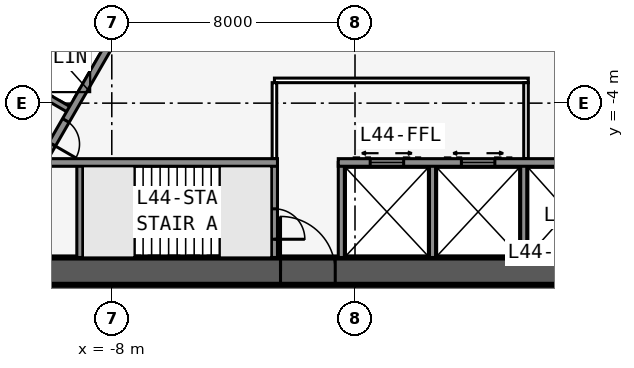
"""IFC4 building model, lengths in metres.
Left out: names, types, materials, properties, quantities, classifications, styles, units other than length and angle.
Written with IfcOpenShell. Run it as: python <this file> out.ifc"""

import sys

from ifc_helpers import new_model, si_unit, direction, frame, frame_2d, origin, place, context, subcontext, project, spatial, rectangle, extrude, element, fill, save


model = new_model("IFC4")
c1 = context("Model", 3, precision=1e-05, world=origin(), true_north=direction((0.0, 1.0)))
c2 = subcontext(c1, "Body", "Model", "MODEL_VIEW")
j1 = project(units=[si_unit("LENGTHUNIT", "METRE"), si_unit("PLANEANGLEUNIT", "RADIAN")], contexts=[c1])
p1 = place(None, origin())
s1 = spatial("IfcSite", under=j1, at=p1, CompositionType="ELEMENT")
p2 = place(p1, origin())
s2 = spatial("IfcBuilding", under=s1, at=p2, CompositionType="ELEMENT")
p3 = place(p2, frame((0.0, 0.0, 165.7)))
s3 = spatial("IfcBuildingStorey", under=s2, at=p3, CompositionType="ELEMENT", Elevation=165.7)
p4 = place(p3, frame((-16.5, -9.526, 0.0), z_axis=(0.0, 0.0, 1.0), x_axis=(1.0, 0.0, 0.0)))
e1 = element("IfcWall", 1, at=p4, inside=s3, PredefinedType="SHEAR", context=c2, shape_type="SweptSolid", body=[
    extrude(rectangle(XDim=33.0, YDim=0.9, at=frame_2d((16.5, 0.0))), origin(), (0.0, 0.0, 1.0), 3.4),
])
p5 = place(p4, frame((14.05, 0.0, 0.0)))
e2 = element("IfcOpeningElement", 2, at=p5, cuts=e1, PredefinedType="OPENING", context=c2, shape_type="SweptSolid", body=[
    extrude(rectangle(XDim=1.8, YDim=2.13, at=frame_2d((0.9, 1.065))), frame((0.0, 0.46, 0.0), z_axis=(0.0, -1.0, 0.0), x_axis=(1.0, 0.0, 0.0)), (0.0, 0.0, 1.0), 0.92),
])
p6 = place(p3, frame((-10.183, -5.951, 0.0), z_axis=(0.0, 0.0, 1.0), x_axis=(1.0, 0.0, 0.0)))
e3 = element("IfcWall", 3, at=p6, inside=s3, PredefinedType="SOLIDWALL", context=c2, shape_type="SweptSolid", body=[
    extrude(rectangle(XDim=7.633, YDim=0.25, at=frame_2d((3.816, 0.0))), origin(), (0.0, 0.0, 1.0), 3.235),
])
p7 = place(p3, frame((-0.55, -5.951, 0.0), z_axis=(0.0, 0.0, 1.0), x_axis=(1.0, 0.0, 0.0)))
e4 = element("IfcWall", 4, at=p7, inside=s3, PredefinedType="SOLIDWALL", context=c2, shape_type="SweptSolid", body=[
    extrude(rectangle(XDim=10.733, YDim=0.25, at=frame_2d((5.366, 0.0))), origin(), (0.0, 0.0, 1.0), 3.235),
])
p8 = place(p7, frame((9.314, 0.0, 0.0)))
e5 = element("IfcOpeningElement", 5, at=p8, cuts=e4, PredefinedType="OPENING", context=c2, shape_type="SweptSolid", body=[
    extrude(rectangle(XDim=0.9, YDim=2.13, at=frame_2d((0.45, 1.065))), frame((0.0, 0.135, 0.0), z_axis=(0.0, -1.0, 0.0), x_axis=(1.0, 0.0, 0.0)), (0.0, 0.0, 1.0), 0.27),
])
p9 = place(p7, frame((1.05, 0.0, 0.0)))
e6 = element("IfcOpeningElement", 6, at=p9, cuts=e4, PredefinedType="OPENING", context=c2, shape_type="SweptSolid", body=[
    extrude(rectangle(XDim=1.1, YDim=2.13, at=frame_2d((0.55, 1.065))), frame((0.0, 0.135, 0.0), z_axis=(0.0, -1.0, 0.0), x_axis=(1.0, 0.0, 0.0)), (0.0, 0.0, 1.0), 0.27),
])
p10 = place(p7, frame((4.05, 0.0, 0.0)))
e7 = element("IfcOpeningElement", 7, at=p10, cuts=e4, PredefinedType="OPENING", context=c2, shape_type="SweptSolid", body=[
    extrude(rectangle(XDim=1.1, YDim=2.13, at=frame_2d((0.55, 1.065))), frame((0.0, 0.135, 0.0), z_axis=(0.0, -1.0, 0.0), x_axis=(1.0, 0.0, 0.0)), (0.0, 0.0, 1.0), 0.27),
])
p11 = place(p3, frame((-9.05, -5.951, 0.0), z_axis=(0.0, 0.0, 1.0), x_axis=(0.0, -1.0, 0.0)))
e8 = element("IfcWall", 8, at=p11, inside=s3, PredefinedType="SOLIDWALL", context=c2, shape_type="SweptSolid", body=[
    extrude(rectangle(XDim=3.125, YDim=0.2, at=frame_2d((1.562, 0.0))), origin(), (0.0, 0.0, 1.0), 3.235),
])
p12 = place(p3, frame((-2.65, -5.951, 0.0), z_axis=(0.0, 0.0, 1.0), x_axis=(0.0, -1.0, 0.0)))
e9 = element("IfcWall", 9, at=p12, inside=s3, PredefinedType="SOLIDWALL", context=c2, shape_type="SweptSolid", body=[
    extrude(rectangle(XDim=3.125, YDim=0.2, at=frame_2d((1.562, 0.0))), origin(), (0.0, 0.0, 1.0), 3.235),
])
p13 = place(p12, frame((1.525, 0.0, 0.0)))
e10 = element("IfcOpeningElement", 10, at=p13, cuts=e9, PredefinedType="OPENING", context=c2, shape_type="SweptSolid", body=[
    extrude(rectangle(XDim=1.0, YDim=2.13, at=frame_2d((0.5, 1.065))), frame((0.0, 0.11, 0.0), z_axis=(0.0, -1.0, 0.0), x_axis=(1.0, 0.0, 0.0)), (0.0, 0.0, 1.0), 0.22),
])
for number, where, z_axis, x_axis in (
    (11, (-0.45, -5.951, 0.0), (0.0, 0.0, 1.0), (0.0, -1.0, 0.0)),
    (12, (2.55, -5.951, 0.0), (0.0, 0.0, 1.0), (0.0, -1.0, 0.0)),
    (13, (5.55, -5.951, 0.0), (0.0, 0.0, 1.0), (0.0, -1.0, 0.0)),
):
    element("IfcWall", number, at=place(p3, frame(where, z_axis=z_axis, x_axis=x_axis)), inside=s3, PredefinedType="SOLIDWALL", context=c2, shape_type="SweptSolid", body=[
        extrude(rectangle(XDim=3.125, YDim=0.2, at=frame_2d((1.562, 0.0))), origin(), (0.0, 0.0, 1.0), 3.235),
    ])
p14 = place(p3, frame((16.5, -9.526, 0.0), z_axis=(0.0, 0.0, 1.0), x_axis=(-0.499999749417, 0.866025548458, 0.0)))
e14 = element("IfcWall", 14, at=p14, inside=s3, PredefinedType="SHEAR", context=c2, shape_type="SweptSolid", body=[
    extrude(rectangle(XDim=33.0, YDim=0.9, at=frame_2d((16.5, 0.0))), origin(), (0.0, 0.0, 1.0), 3.4),
])
p15 = place(p14, frame((14.15, 0.0, 0.0)))
e15 = element("IfcOpeningElement", 15, at=p15, cuts=e14, PredefinedType="OPENING", context=c2, shape_type="SweptSolid", body=[
    extrude(rectangle(XDim=1.8, YDim=2.13, at=frame_2d((0.9, 1.065))), frame((0.0, 0.46, 0.0), z_axis=(0.0, -1.0, 0.0), x_axis=(1.0, 0.0, 0.0)), (0.0, 0.0, 1.0), 0.92),
])
p16 = place(p14, frame((12.6, 0.0, 0.0)))
e16 = element("IfcOpeningElement", 16, at=p16, cuts=e14, PredefinedType="OPENING", context=c2, shape_type="SweptSolid", body=[
    extrude(rectangle(XDim=1.0, YDim=2.13, at=frame_2d((0.5, 1.065))), frame((0.0, 0.46, 0.0), z_axis=(0.0, -1.0, 0.0), x_axis=(1.0, 0.0, 0.0)), (0.0, 0.0, 1.0), 0.92),
])
p17 = place(p3, frame((10.245, -5.843, 0.0), z_axis=(0.0, 0.0, 1.0), x_axis=(-0.499993009313, 0.866029439822, 0.0)))
e17 = element("IfcWall", 17, at=p17, inside=s3, PredefinedType="SOLIDWALL", context=c2, shape_type="SweptSolid", body=[
    extrude(rectangle(XDim=7.733, YDim=0.25, at=frame_2d((3.866, 0.0))), origin(), (0.0, 0.0, 1.0), 3.235),
])
p18 = place(p3, frame((0.0, 19.052, 0.0), z_axis=(0.0, 0.0, 1.0), x_axis=(-0.499999749417, -0.866025548458, 0.0)))
e18 = element("IfcWall", 18, at=p18, inside=s3, PredefinedType="SHEAR", context=c2, shape_type="SweptSolid", body=[
    extrude(rectangle(XDim=33.0, YDim=0.9, at=frame_2d((16.5, 0.0))), origin(), (0.0, 0.0, 1.0), 3.4),
])
p19 = place(p18, frame((14.15, 0.0, 0.0)))
e19 = element("IfcOpeningElement", 19, at=p19, cuts=e18, PredefinedType="OPENING", context=c2, shape_type="SweptSolid", body=[
    extrude(rectangle(XDim=1.8, YDim=2.13, at=frame_2d((0.9, 1.065))), frame((0.0, 0.46, 0.0), z_axis=(0.0, -1.0, 0.0), x_axis=(1.0, 0.0, 0.0)), (0.0, 0.0, 1.0), 0.92),
])
p20 = place(p18, frame((12.6, 0.0, 0.0)))
e20 = element("IfcOpeningElement", 20, at=p20, cuts=e18, PredefinedType="OPENING", context=c2, shape_type="SweptSolid", body=[
    extrude(rectangle(XDim=1.0, YDim=2.13, at=frame_2d((0.5, 1.065))), frame((0.0, 0.46, 0.0), z_axis=(0.0, -1.0, 0.0), x_axis=(1.0, 0.0, 0.0)), (0.0, 0.0, 1.0), 0.92),
])
p21 = place(p3, frame((-4.929, 3.365, 0.0), z_axis=(0.0, 0.0, 1.0), x_axis=(-0.499991433582, -0.866030349552, 0.0)))
e21 = element("IfcWall", 21, at=p21, inside=s3, PredefinedType="SOLIDWALL", context=c2, shape_type="SweptSolid", body=[
    extrude(rectangle(XDim=10.633, YDim=0.25, at=frame_2d((5.316, 0.0))), origin(), (0.0, 0.0, 1.0), 3.235),
])
p22 = place(p21, frame((9.164, 0.0, 0.0)))
e22 = element("IfcOpeningElement", 22, at=p22, cuts=e21, PredefinedType="OPENING", context=c2, shape_type="SweptSolid", body=[
    extrude(rectangle(XDim=0.9, YDim=2.13, at=frame_2d((0.45, 1.065))), frame((0.0, 0.135, 0.0), z_axis=(0.0, -1.0, 0.0), x_axis=(1.0, 0.0, 0.0)), (0.0, 0.0, 1.0), 0.27),
])
p23 = place(p3, frame((-9.329, -4.256, 0.0), z_axis=(0.0, 0.0, 1.0), x_axis=(-0.866022959057, 0.500004234368, 0.0)))
e23 = element("IfcWall", 23, at=p23, inside=s3, PredefinedType="SOLIDWALL", context=c2, shape_type="SweptSolid", body=[
    extrude(rectangle(XDim=3.125, YDim=0.2, at=frame_2d((1.562, 0.0))), origin(), (0.0, 0.0, 1.0), 3.235),
])
p24 = place(p3, frame((21.586, -11.885, 0.0), z_axis=(0.0, 0.0, 1.0), x_axis=(-0.500001915564, 0.86602429783, 0.0)))
e24 = element("IfcWall", 24, at=p24, inside=s3, PredefinedType="PARTITIONING", context=c2, shape_type="SweptSolid", body=[
    extrude(rectangle(XDim=42.172, YDim=0.15, at=frame_2d((21.086, 0.0))), origin(), (0.0, 0.0, 1.0), 3.235),
])
p25 = place(p24, frame((1.911, 0.0, 0.0)))
e25 = element("IfcOpeningElement", 25, at=p25, cuts=e24, PredefinedType="OPENING", context=c2, shape_type="SweptSolid", body=[
    extrude(rectangle(XDim=0.95, YDim=2.13, at=frame_2d((0.475, 1.065))), frame((0.0, 0.085, 0.0), z_axis=(0.0, -1.0, 0.0), x_axis=(1.0, 0.0, 0.0)), (0.0, 0.0, 1.0), 0.17),
])
p26 = place(p24, frame((9.311, 0.0, 0.0)))
e26 = element("IfcOpeningElement", 26, at=p26, cuts=e24, PredefinedType="OPENING", context=c2, shape_type="SweptSolid", body=[
    extrude(rectangle(XDim=0.95, YDim=2.13, at=frame_2d((0.475, 1.065))), frame((0.0, 0.085, 0.0), z_axis=(0.0, -1.0, 0.0), x_axis=(1.0, 0.0, 0.0)), (0.0, 0.0, 1.0), 0.17),
])
p27 = place(p24, frame((14.611, 0.0, 0.0)))
e27 = element("IfcOpeningElement", 27, at=p27, cuts=e24, PredefinedType="OPENING", context=c2, shape_type="SweptSolid", body=[
    extrude(rectangle(XDim=0.95, YDim=2.13, at=frame_2d((0.475, 1.065))), frame((0.0, 0.085, 0.0), z_axis=(0.0, -1.0, 0.0), x_axis=(1.0, 0.0, 0.0)), (0.0, 0.0, 1.0), 0.17),
])
p28 = place(p24, frame((26.711, 0.0, 0.0)))
e28 = element("IfcOpeningElement", 28, at=p28, cuts=e24, PredefinedType="OPENING", context=c2, shape_type="SweptSolid", body=[
    extrude(rectangle(XDim=0.95, YDim=2.13, at=frame_2d((0.475, 1.065))), frame((0.0, 0.085, 0.0), z_axis=(0.0, -1.0, 0.0), x_axis=(1.0, 0.0, 0.0)), (0.0, 0.0, 1.0), 0.17),
])
p29 = place(p24, frame((38.884, 0.0, 0.0)))
e29 = element("IfcOpeningElement", 29, at=p29, cuts=e24, PredefinedType="OPENING", context=c2, shape_type="SweptSolid", body=[
    extrude(rectangle(XDim=0.95, YDim=2.13, at=frame_2d((0.475, 1.065))), frame((0.0, 0.085, 0.0), z_axis=(0.0, -1.0, 0.0), x_axis=(1.0, 0.0, 0.0)), (0.0, 0.0, 1.0), 0.17),
])
p30 = place(p3, frame((-0.5, 22.836, 0.0), z_axis=(0.0, 0.0, 1.0), x_axis=(-0.500001677587, -0.866024435227, 0.0)))
e30 = element("IfcWall", 30, at=p30, inside=s3, PredefinedType="PARTITIONING", context=c2, shape_type="SweptSolid", body=[
    extrude(rectangle(XDim=39.054, YDim=0.15, at=frame_2d((19.527, 0.0))), origin(), (0.0, 0.0, 1.0), 3.235),
])
p31 = place(p30, frame((1.558, 0.0, 0.0)))
e31 = element("IfcOpeningElement", 31, at=p31, cuts=e30, PredefinedType="OPENING", context=c2, shape_type="SweptSolid", body=[
    extrude(rectangle(XDim=0.95, YDim=2.13, at=frame_2d((0.475, 1.065))), frame((0.0, 0.085, 0.0), z_axis=(0.0, -1.0, 0.0), x_axis=(1.0, 0.0, 0.0)), (0.0, 0.0, 1.0), 0.17),
])
p32 = place(p30, frame((19.052, 0.0, 0.0)))
e32 = element("IfcOpeningElement", 32, at=p32, cuts=e30, PredefinedType="OPENING", context=c2, shape_type="SweptSolid", body=[
    extrude(rectangle(XDim=0.95, YDim=2.13, at=frame_2d((0.475, 1.065))), frame((0.0, 0.085, 0.0), z_axis=(0.0, -1.0, 0.0), x_axis=(1.0, 0.0, 0.0)), (0.0, 0.0, 1.0), 0.17),
])
p33 = place(p30, frame((31.752, 0.0, 0.0)))
e33 = element("IfcOpeningElement", 33, at=p33, cuts=e30, PredefinedType="OPENING", context=c2, shape_type="SweptSolid", body=[
    extrude(rectangle(XDim=0.95, YDim=2.13, at=frame_2d((0.475, 1.065))), frame((0.0, 0.085, 0.0), z_axis=(0.0, -1.0, 0.0), x_axis=(1.0, 0.0, 0.0)), (0.0, 0.0, 1.0), 0.17),
])
p34 = place(p30, frame((37.752, 0.0, 0.0)))
e34 = element("IfcOpeningElement", 34, at=p34, cuts=e30, PredefinedType="OPENING", context=c2, shape_type="SweptSolid", body=[
    extrude(rectangle(XDim=0.95, YDim=2.13, at=frame_2d((0.475, 1.065))), frame((0.0, 0.085, 0.0), z_axis=(0.0, -1.0, 0.0), x_axis=(1.0, 0.0, 0.0)), (0.0, 0.0, 1.0), 0.17),
])
p35 = place(p3, frame((-2.65, -3.251, 0.0), z_axis=(0.0, 0.0, 1.0), x_axis=(1.0, 0.0, 0.0)))
e35 = element("IfcWall", 35, at=p35, inside=s3, PredefinedType="PARTITIONING", context=c2, shape_type="SweptSolid", body=[
    extrude(rectangle(XDim=8.35, YDim=0.15, at=frame_2d((4.175, 0.0))), origin(), (0.0, 0.0, 1.0), 3.235),
])
for number, where, z_axis, x_axis in (
    (36, (-2.65, -5.826, 0.0), (0.0, 0.0, 1.0), (0.0, 1.0, 0.0)),
    (37, (5.625, -5.826, 0.0), (0.0, 0.0, 1.0), (0.0, 1.0, 0.0)),
):
    element("IfcWall", number, at=place(p3, frame(where, z_axis=z_axis, x_axis=x_axis)), inside=s3, PredefinedType="PARTITIONING", context=c2, shape_type="SweptSolid", body=[
        extrude(rectangle(XDim=2.5, YDim=0.15, at=frame_2d((1.25, 0.0))), origin(), (0.0, 0.0, 1.0), 3.235),
    ])
p36 = place(p3, frame((-7.247, -7.576, 0.0), z_axis=(0.0, 0.0, 1.0), x_axis=(1.0, 0.0, 0.0)))
e38 = element("IfcWall", 38, at=p36, inside=s3, PredefinedType="SOLIDWALL", context=c2, shape_type="SweptSolid", body=[
    extrude(rectangle(XDim=2.794, YDim=0.1, at=frame_2d((1.397, 0.0))), origin(), (0.0, 0.0, 1.0), 3.4),
])
p37 = place(p5, origin())
e39 = element("IfcDoor", 39, at=p37, inside=s3, OperationType="DOUBLE_DOOR_SINGLE_SWING", PredefinedType="DOOR", context=c2, shape_type="SweptSolid", body=[
    extrude(rectangle(XDim=1.8, YDim=2.13, at=frame_2d((0.9, 1.065))), frame((0.0, 0.025, 0.0), z_axis=(0.0, -1.0, 0.0), x_axis=(1.0, 0.0, 0.0)), (0.0, 0.0, 1.0), 0.05),
])
fill(e2, e39)
p38 = place(p13, origin())
e40 = element("IfcDoor", 40, at=p38, inside=s3, OperationType="SINGLE_SWING_RIGHT", PredefinedType="DOOR", context=c2, shape_type="SweptSolid", body=[
    extrude(rectangle(XDim=1.0, YDim=2.13, at=frame_2d((0.5, 1.065))), frame((0.0, 0.025, 0.0), z_axis=(0.0, -1.0, 0.0), x_axis=(1.0, 0.0, 0.0)), (0.0, 0.0, 1.0), 0.05),
])
fill(e10, e40)
p39 = place(p22, origin())
e41 = element("IfcDoor", 41, at=p39, inside=s3, OperationType="SINGLE_SWING_RIGHT", PredefinedType="DOOR", context=c2, shape_type="SweptSolid", body=[
    extrude(rectangle(XDim=0.9, YDim=2.13, at=frame_2d((0.45, 1.065))), frame((0.0, 0.025, 0.0), z_axis=(0.0, -1.0, 0.0), x_axis=(1.0, 0.0, 0.0)), (0.0, 0.0, 1.0), 0.05),
])
fill(e22, e41)
p40 = place(p9, origin())
e42 = element("IfcDoor", 42, at=p40, inside=s3, OperationType="DOUBLE_DOOR_SLIDING", PredefinedType="USERDEFINED", context=c2, shape_type="SweptSolid", body=[
    extrude(rectangle(XDim=1.1, YDim=2.13, at=frame_2d((0.55, 1.065))), frame((0.0, 0.025, 0.0), z_axis=(0.0, -1.0, 0.0), x_axis=(1.0, 0.0, 0.0)), (0.0, 0.0, 1.0), 0.05),
])
fill(e6, e42)
p41 = place(p10, origin())
e43 = element("IfcDoor", 43, at=p41, inside=s3, OperationType="DOUBLE_DOOR_SLIDING", PredefinedType="USERDEFINED", context=c2, shape_type="SweptSolid", body=[
    extrude(rectangle(XDim=1.1, YDim=2.13, at=frame_2d((0.55, 1.065))), frame((0.0, 0.025, 0.0), z_axis=(0.0, -1.0, 0.0), x_axis=(1.0, 0.0, 0.0)), (0.0, 0.0, 1.0), 0.05),
])
fill(e7, e43)
save(model, sys.argv[1])
